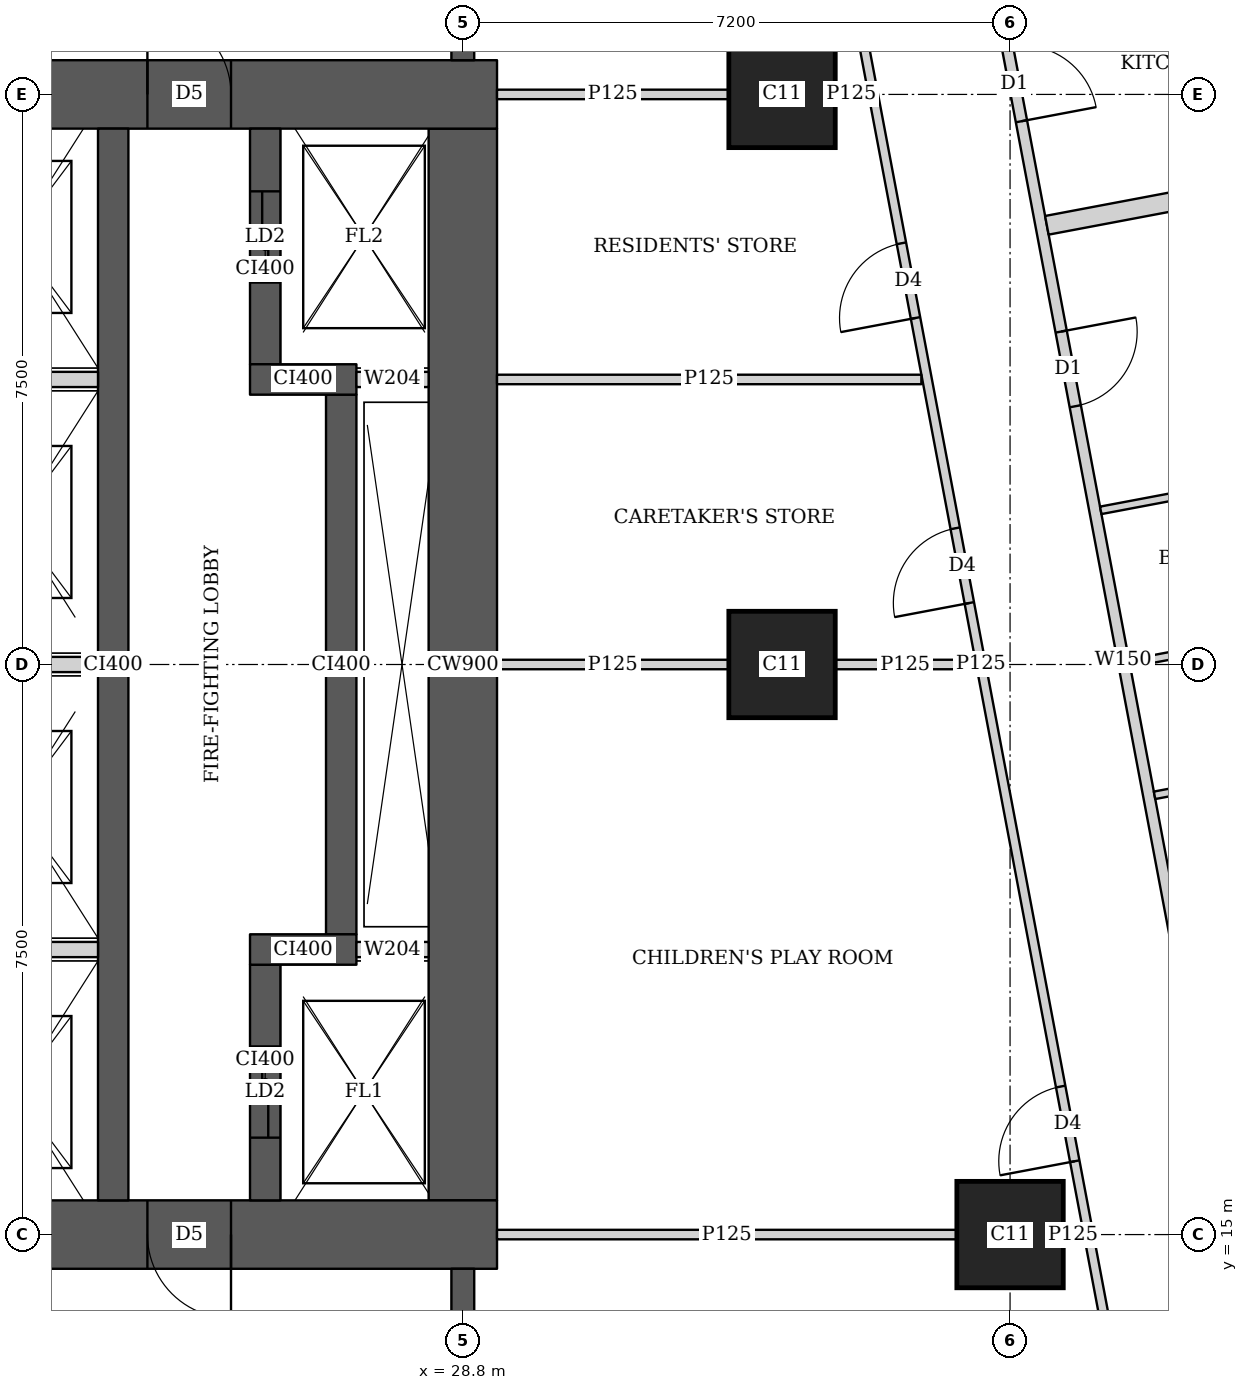
"""IFC4 building model, lengths in metres.
Left out: names, types, materials, properties, quantities, classifications, styles, units other than length and angle.
Written with IfcOpenShell. Run it as: python <this file> out.ifc"""

import sys

from ifc_helpers import new_model, si_unit, direction, frame, frame_2d, origin, origin_2d, place, context, subcontext, project, spatial, rectangle, extrude, element, fill, save


model = new_model("IFC4")
c1 = context("Model", 3, precision=1e-05, world=origin(), true_north=direction((0.0, 1.0)))
c2 = subcontext(c1, "Body", "Model", "MODEL_VIEW")
j1 = project(units=[si_unit("LENGTHUNIT", "METRE"), si_unit("PLANEANGLEUNIT", "RADIAN")], contexts=[c1])
p1 = place(None, origin())
s1 = spatial("IfcSite", under=j1, at=p1, CompositionType="ELEMENT")
p2 = place(p1, origin())
s2 = spatial("IfcBuilding", under=s1, at=p2, CompositionType="ELEMENT")
p3 = place(p2, frame((0.0, 0.0, 208.7)))
s3 = spatial("IfcBuildingStorey", under=s2, at=p3, CompositionType="ELEMENT", Elevation=208.7)
for number, where, z_axis, x_axis in (
    (1, (36.0, 15.0, 0.0), (0.0, 0.0, 1.0), (1.0, 0.0, 0.0)),
    (2, (33.0, 22.5, 0.0), (0.0, 0.0, 1.0), (1.0, 0.0, 0.0)),
    (3, (33.0, 30.0, 0.0), (0.0, 0.0, 1.0), (1.0, 0.0, 0.0)),
):
    element("IfcColumn", number, at=place(p3, frame(where, z_axis=z_axis, x_axis=x_axis)), inside=s3, PredefinedType="COLUMN", context=c2, shape_type="SweptSolid", body=[
        extrude(rectangle(XDim=1.4, YDim=1.4, at=origin_2d()), origin(), (0.0, 0.0, 1.0), 3.75),
    ])
p4 = place(p3, frame((13.95, 15.0, 0.0), z_axis=(0.0, 0.0, 1.0), x_axis=(1.0, 0.0, 0.0)))
e4 = element("IfcWall", 4, at=p4, inside=s3, PredefinedType="SHEAR", context=c2, shape_type="SweptSolid", body=[
    extrude(rectangle(XDim=15.3, YDim=0.9, at=frame_2d((7.65, 0.0))), origin(), (0.0, 0.0, 1.0), 3.75),
])
p5 = place(p4, frame((4.45, 0.0, 0.0)))
e5 = element("IfcOpeningElement", 5, at=p5, cuts=e4, PredefinedType="OPENING", context=c2, shape_type="SweptSolid", body=[
    extrude(rectangle(XDim=1.8, YDim=2.1, at=frame_2d((0.9, 1.05))), frame((0.0, 0.46, 0.0), z_axis=(0.0, -1.0, 0.0), x_axis=(1.0, 0.0, 0.0)), (0.0, 0.0, 1.0), 0.92),
])
p6 = place(p4, frame((10.7, 0.0, 0.0)))
e6 = element("IfcOpeningElement", 6, at=p6, cuts=e4, PredefinedType="OPENING", context=c2, shape_type="SweptSolid", body=[
    extrude(rectangle(XDim=1.1, YDim=2.1, at=frame_2d((0.55, 1.05))), frame((0.0, 0.46, 0.0), z_axis=(0.0, -1.0, 0.0), x_axis=(1.0, 0.0, 0.0)), (0.0, 0.0, 1.0), 0.92),
])
p7 = place(p3, frame((13.95, 30.0, 0.0), z_axis=(0.0, 0.0, 1.0), x_axis=(1.0, 0.0, 0.0)))
e7 = element("IfcWall", 7, at=p7, inside=s3, PredefinedType="SHEAR", context=c2, shape_type="SweptSolid", body=[
    extrude(rectangle(XDim=15.3, YDim=0.9, at=frame_2d((7.65, 0.0))), origin(), (0.0, 0.0, 1.0), 3.75),
])
p8 = place(p7, frame((4.45, 0.0, 0.0)))
e8 = element("IfcOpeningElement", 8, at=p8, cuts=e7, PredefinedType="OPENING", context=c2, shape_type="SweptSolid", body=[
    extrude(rectangle(XDim=1.8, YDim=2.1, at=frame_2d((0.9, 1.05))), frame((0.0, 0.46, 0.0), z_axis=(0.0, -1.0, 0.0), x_axis=(1.0, 0.0, 0.0)), (0.0, 0.0, 1.0), 0.92),
])
p9 = place(p7, frame((10.7, 0.0, 0.0)))
e9 = element("IfcOpeningElement", 9, at=p9, cuts=e7, PredefinedType="OPENING", context=c2, shape_type="SweptSolid", body=[
    extrude(rectangle(XDim=1.1, YDim=2.1, at=frame_2d((0.55, 1.05))), frame((0.0, 0.46, 0.0), z_axis=(0.0, -1.0, 0.0), x_axis=(1.0, 0.0, 0.0)), (0.0, 0.0, 1.0), 0.92),
])
p10 = place(p3, frame((28.8, 15.45, 0.0), z_axis=(0.0, 0.0, 1.0), x_axis=(0.0, 1.0, 0.0)))
e10 = element("IfcWall", 10, at=p10, inside=s3, PredefinedType="SHEAR", context=c2, shape_type="SweptSolid", body=[
    extrude(rectangle(XDim=14.1, YDim=0.9, at=frame_2d((7.05, 0.0))), origin(), (0.0, 0.0, 1.0), 3.75),
])
p11 = place(p3, frame((24.2, 15.45, 0.0), z_axis=(0.0, 0.0, 1.0), x_axis=(0.0, 1.0, 0.0)))
e11 = element("IfcWall", 11, at=p11, inside=s3, PredefinedType="SHEAR", context=c2, shape_type="SweptSolid", body=[
    extrude(rectangle(XDim=14.1, YDim=0.4, at=frame_2d((7.05, 0.0))), origin(), (0.0, 0.0, 1.0), 3.75),
])
p12 = place(p3, frame((26.2, 15.45, 0.0), z_axis=(0.0, 0.0, 1.0), x_axis=(0.0, 1.0, 0.0)))
e12 = element("IfcWall", 12, at=p12, inside=s3, PredefinedType="SHEAR", context=c2, shape_type="SweptSolid", body=[
    extrude(rectangle(XDim=3.1, YDim=0.4, at=frame_2d((1.55, 0.0))), origin(), (0.0, 0.0, 1.0), 3.75),
])
p13 = place(p12, frame((0.825, 0.0, 0.0)))
e13 = element("IfcOpeningElement", 13, at=p13, cuts=e12, PredefinedType="OPENING", context=c2, shape_type="SweptSolid", body=[
    extrude(rectangle(XDim=1.2, YDim=2.1, at=frame_2d((0.6, 1.05))), frame((0.0, 0.21, 0.0), z_axis=(0.0, -1.0, 0.0), x_axis=(1.0, 0.0, 0.0)), (0.0, 0.0, 1.0), 0.42),
])
p14 = place(p3, frame((26.0, 18.75, 0.0), z_axis=(0.0, 0.0, 1.0), x_axis=(1.0, 0.0, 0.0)))
e14 = element("IfcWall", 14, at=p14, inside=s3, PredefinedType="SHEAR", context=c2, shape_type="SweptSolid", body=[
    extrude(rectangle(XDim=1.4, YDim=0.4, at=frame_2d((0.7, 0.0))), origin(), (0.0, 0.0, 1.0), 3.75),
])
p15 = place(p3, frame((27.2, 18.95, 0.0), z_axis=(0.0, 0.0, 1.0), x_axis=(0.0, 1.0, 0.0)))
e15 = element("IfcWall", 15, at=p15, inside=s3, PredefinedType="SHEAR", context=c2, shape_type="SweptSolid", body=[
    extrude(rectangle(XDim=7.1, YDim=0.4, at=frame_2d((3.55, 0.0))), origin(), (0.0, 0.0, 1.0), 3.75),
])
p16 = place(p3, frame((26.0, 26.25, 0.0), z_axis=(0.0, 0.0, 1.0), x_axis=(1.0, 0.0, 0.0)))
e16 = element("IfcWall", 16, at=p16, inside=s3, PredefinedType="SHEAR", context=c2, shape_type="SweptSolid", body=[
    extrude(rectangle(XDim=1.4, YDim=0.4, at=frame_2d((0.7, 0.0))), origin(), (0.0, 0.0, 1.0), 3.75),
])
p17 = place(p3, frame((26.2, 26.45, 0.0), z_axis=(0.0, 0.0, 1.0), x_axis=(0.0, 1.0, 0.0)))
e17 = element("IfcWall", 17, at=p17, inside=s3, PredefinedType="SHEAR", context=c2, shape_type="SweptSolid", body=[
    extrude(rectangle(XDim=3.1, YDim=0.4, at=frame_2d((1.55, 0.0))), origin(), (0.0, 0.0, 1.0), 3.75),
])
p18 = place(p17, frame((1.075, 0.0, 0.0)))
e18 = element("IfcOpeningElement", 18, at=p18, cuts=e17, PredefinedType="OPENING", context=c2, shape_type="SweptSolid", body=[
    extrude(rectangle(XDim=1.2, YDim=2.1, at=frame_2d((0.6, 1.05))), frame((0.0, 0.21, 0.0), z_axis=(0.0, -1.0, 0.0), x_axis=(1.0, 0.0, 0.0)), (0.0, 0.0, 1.0), 0.42),
])
for number, where, z_axis, x_axis in (
    (19, (28.8, 10.35, 0.0), (0.0, 0.0, 1.0), (0.0, 1.0, 0.0)),
    (20, (28.8, 30.45, 0.0), (0.0, 0.0, 1.0), (0.0, 1.0, 0.0)),
):
    element("IfcWall", number, at=place(p3, frame(where, z_axis=z_axis, x_axis=x_axis)), inside=s3, PredefinedType="SHEAR", context=c2, shape_type="SweptSolid", body=[
        extrude(rectangle(XDim=4.2, YDim=0.3, at=frame_2d((2.1, 0.0))), origin(), (0.0, 0.0, 1.0), 3.75),
    ])
p19 = place(p3, frame((33.68, 42.723, 0.0), z_axis=(0.0, 0.0, 1.0), x_axis=(0.185601160014, -0.982625162207, 0.0)))
e21 = element("IfcWall", 21, at=p19, inside=s3, PredefinedType="SOLIDWALL", context=c2, shape_type="SweptSolid", body=[
    extrude(rectangle(XDim=41.051, YDim=0.15, at=frame_2d((20.526, 0.0))), origin(), (0.0, 0.0, 1.0), 2.5),
])
p20 = place(p19, frame((12.307, 0.0, 0.0)))
e22 = element("IfcOpeningElement", 22, at=p20, cuts=e21, PredefinedType="OPENING", context=c2, shape_type="SweptSolid", body=[
    extrude(rectangle(XDim=1.0, YDim=2.1, at=frame_2d((0.5, 1.05))), frame((0.0, 0.085, 0.0), z_axis=(0.0, -1.0, 0.0), x_axis=(1.0, 0.0, 0.0)), (0.0, 0.0, 1.0), 0.17),
])
p21 = place(p19, frame((16.123, 0.0, 0.0)))
e23 = element("IfcOpeningElement", 23, at=p21, cuts=e21, PredefinedType="OPENING", context=c2, shape_type="SweptSolid", body=[
    extrude(rectangle(XDim=1.0, YDim=2.1, at=frame_2d((0.5, 1.05))), frame((0.0, 0.085, 0.0), z_axis=(0.0, -1.0, 0.0), x_axis=(1.0, 0.0, 0.0)), (0.0, 0.0, 1.0), 0.17),
])
p22 = place(p19, frame((30.902, 0.0, 0.0)))
e24 = element("IfcOpeningElement", 24, at=p22, cuts=e21, PredefinedType="OPENING", context=c2, shape_type="SweptSolid", body=[
    extrude(rectangle(XDim=1.0, YDim=2.1, at=frame_2d((0.5, 1.05))), frame((0.0, 0.085, 0.0), z_axis=(0.0, -1.0, 0.0), x_axis=(1.0, 0.0, 0.0)), (0.0, 0.0, 1.0), 0.17),
])
p23 = place(p3, frame((40.657, 25.183, 0.0), z_axis=(0.0, 0.0, 1.0), x_axis=(-0.982585626838, -0.185810349366, 0.0)))
e25 = element("IfcWall", 25, at=p23, inside=s3, PredefinedType="PARTITIONING", context=c2, shape_type="SweptSolid", body=[
    extrude(rectangle(XDim=3.525, YDim=0.1, at=frame_2d((1.763, 0.0))), origin(), (0.0, 0.0, 1.0), 3.5),
])
p24 = place(p3, frame((41.365, 21.433, 0.0), z_axis=(0.0, 0.0, 1.0), x_axis=(-0.982638553676, -0.185530247748, 0.0)))
e26 = element("IfcWall", 26, at=p24, inside=s3, PredefinedType="PARTITIONING", context=c2, shape_type="SweptSolid", body=[
    extrude(rectangle(XDim=3.525, YDim=0.1, at=frame_2d((1.763, 0.0))), origin(), (0.0, 0.0, 1.0), 3.5),
])
p25 = place(p3, frame((41.037, 23.168, 0.0), z_axis=(0.0, 0.0, 1.0), x_axis=(-0.982638553676, -0.185530247748, 0.0)))
e27 = element("IfcWall", 27, at=p25, inside=s3, PredefinedType="PARTITIONING", context=c2, shape_type="SweptSolid", body=[
    extrude(rectangle(XDim=3.525, YDim=0.1, at=frame_2d((1.763, 0.0))), origin(), (0.0, 0.0, 1.0), 2.5),
])
p26 = place(p3, frame((41.177, 29.164, 0.0), z_axis=(0.0, 0.0, 1.0), x_axis=(-0.982642846239, -0.185507511263, 0.0)))
e28 = element("IfcWall", 28, at=p26, inside=s3, PredefinedType="SOLIDWALL", context=c2, shape_type="SweptSolid", body=[
    extrude(rectangle(XDim=4.776, YDim=0.25, at=frame_2d((2.388, 0.0))), origin(), (0.0, 0.0, 1.0), 2.5),
])
p27 = place(p3, frame((37.9, 10.413, 0.0), z_axis=(0.0, 0.0, 1.0), x_axis=(-0.185589740669, 0.982627319058, 0.0)))
e29 = element("IfcWall", 29, at=p27, inside=s3, PredefinedType="PARTITIONING", context=c2, shape_type="SweptSolid", body=[
    extrude(rectangle(XDim=24.602, YDim=0.125, at=frame_2d((12.301, 0.0))), origin(), (0.0, 0.0, 1.0), 2.5),
])
p28 = place(p27, frame((0.708, 0.0, 0.0)))
e30 = element("IfcOpeningElement", 30, at=p28, cuts=e29, PredefinedType="OPENING", context=c2, shape_type="SweptSolid", body=[
    extrude(rectangle(XDim=1.0, YDim=2.1, at=frame_2d((0.5, 1.05))), frame((0.0, 0.073, 0.0), z_axis=(0.0, -1.0, 0.0), x_axis=(1.0, 0.0, 0.0)), (0.0, 0.0, 1.0), 0.145),
])
p29 = place(p27, frame((5.65, 0.0, 0.0)))
e31 = element("IfcOpeningElement", 31, at=p29, cuts=e29, PredefinedType="OPENING", context=c2, shape_type="SweptSolid", body=[
    extrude(rectangle(XDim=1.0, YDim=2.1, at=frame_2d((0.5, 1.05))), frame((0.0, 0.073, 0.0), z_axis=(0.0, -1.0, 0.0), x_axis=(1.0, 0.0, 0.0)), (0.0, 0.0, 1.0), 0.145),
])
p30 = place(p27, frame((13.124, 0.0, 0.0)))
e32 = element("IfcOpeningElement", 32, at=p30, cuts=e29, PredefinedType="OPENING", context=c2, shape_type="SweptSolid", body=[
    extrude(rectangle(XDim=1.0, YDim=2.1, at=frame_2d((0.5, 1.05))), frame((0.0, 0.073, 0.0), z_axis=(0.0, -1.0, 0.0), x_axis=(1.0, 0.0, 0.0)), (0.0, 0.0, 1.0), 0.145),
])
p31 = place(p27, frame((16.94, 0.0, 0.0)))
e33 = element("IfcOpeningElement", 33, at=p31, cuts=e29, PredefinedType="OPENING", context=c2, shape_type="SweptSolid", body=[
    extrude(rectangle(XDim=1.0, YDim=2.1, at=frame_2d((0.5, 1.05))), frame((0.0, 0.073, 0.0), z_axis=(0.0, -1.0, 0.0), x_axis=(1.0, 0.0, 0.0)), (0.0, 0.0, 1.0), 0.145),
])
p32 = place(p27, frame((20.9, 0.0, 0.0)))
e34 = element("IfcOpeningElement", 34, at=p32, cuts=e29, PredefinedType="OPENING", context=c2, shape_type="SweptSolid", body=[
    extrude(rectangle(XDim=1.0, YDim=2.1, at=frame_2d((0.5, 1.05))), frame((0.0, 0.073, 0.0), z_axis=(0.0, -1.0, 0.0), x_axis=(1.0, 0.0, 0.0)), (0.0, 0.0, 1.0), 0.145),
])
p33 = place(p3, frame((29.25, 15.0, 0.0), z_axis=(0.0, 0.0, 1.0), x_axis=(1.0, 0.0, 0.0)))
e35 = element("IfcWall", 35, at=p33, inside=s3, PredefinedType="PARTITIONING", context=c2, shape_type="SweptSolid", body=[
    extrude(rectangle(XDim=6.049, YDim=0.125, at=frame_2d((3.024, 0.0))), origin(), (0.0, 0.0, 1.0), 3.5),
])
p34 = place(p3, frame((36.701, 15.0, 0.0), z_axis=(0.0, 0.0, 1.0), x_axis=(1.0, 0.0, 0.0)))
e36 = element("IfcWall", 36, at=p34, inside=s3, PredefinedType="PARTITIONING", context=c2, shape_type="SweptSolid", body=[
    extrude(rectangle(XDim=0.257, YDim=0.125, at=frame_2d((0.128, 0.0))), origin(), (0.0, 0.0, 1.0), 3.5),
])
p35 = place(p3, frame((29.25, 22.5, 0.0), z_axis=(0.0, 0.0, 1.0), x_axis=(1.0, 0.0, 0.0)))
e37 = element("IfcWall", 37, at=p35, inside=s3, PredefinedType="PARTITIONING", context=c2, shape_type="SweptSolid", body=[
    extrude(rectangle(XDim=3.049, YDim=0.125, at=frame_2d((1.524, 0.0))), origin(), (0.0, 0.0, 1.0), 3.5),
])
p36 = place(p3, frame((33.701, 22.5, 0.0), z_axis=(0.0, 0.0, 1.0), x_axis=(1.0, 0.0, 0.0)))
e38 = element("IfcWall", 38, at=p36, inside=s3, PredefinedType="PARTITIONING", context=c2, shape_type="SweptSolid", body=[
    extrude(rectangle(XDim=1.841, YDim=0.125, at=frame_2d((0.92, 0.0))), origin(), (0.0, 0.0, 1.0), 2.5),
])
p37 = place(p3, frame((29.25, 26.25, 0.0), z_axis=(0.0, 0.0, 1.0), x_axis=(1.0, 0.0, 0.0)))
e39 = element("IfcWall", 39, at=p37, inside=s3, PredefinedType="PARTITIONING", context=c2, shape_type="SweptSolid", body=[
    extrude(rectangle(XDim=5.583, YDim=0.125, at=frame_2d((2.792, 0.0))), origin(), (0.0, 0.0, 1.0), 3.5),
])
p38 = place(p3, frame((29.25, 30.0, 0.0), z_axis=(0.0, 0.0, 1.0), x_axis=(1.0, 0.0, 0.0)))
e40 = element("IfcWall", 40, at=p38, inside=s3, PredefinedType="PARTITIONING", context=c2, shape_type="SweptSolid", body=[
    extrude(rectangle(XDim=3.049, YDim=0.125, at=frame_2d((1.524, 0.0))), origin(), (0.0, 0.0, 1.0), 3.5),
])
p39 = place(p3, frame((33.701, 30.0, 0.0), z_axis=(0.0, 0.0, 1.0), x_axis=(1.0, 0.0, 0.0)))
e41 = element("IfcWall", 41, at=p39, inside=s3, PredefinedType="PARTITIONING", context=c2, shape_type="SweptSolid", body=[
    extrude(rectangle(XDim=0.424, YDim=0.125, at=frame_2d((0.212, 0.0))), origin(), (0.0, 0.0, 1.0), 2.5),
])
for number, where, z_axis, x_axis in (
    (42, (21.8, 18.75, 0.0), (0.0, 0.0, 1.0), (1.0, 0.0, 0.0)),
    (43, (21.8, 22.5, 0.0), (0.0, 0.0, 1.0), (1.0, 0.0, 0.0)),
    (44, (21.8, 26.25, 0.0), (0.0, 0.0, 1.0), (1.0, 0.0, 0.0)),
):
    element("IfcWall", number, at=place(p3, frame(where, z_axis=z_axis, x_axis=x_axis)), inside=s3, PredefinedType="SOLIDWALL", context=c2, shape_type="SweptSolid", body=[
        extrude(rectangle(XDim=2.2, YDim=0.2, at=frame_2d((1.1, 0.0))), origin(), (0.0, 0.0, 1.0), 3.5),
    ])
for number, where, z_axis, x_axis in (
    (45, (27.4, 18.75, 0.0), (0.0, 0.0, 1.0), (1.0, 0.0, 0.0)),
    (46, (27.4, 26.25, 0.0), (0.0, 0.0, 1.0), (1.0, 0.0, 0.0)),
):
    element("IfcWall", number, at=place(p3, frame(where, z_axis=z_axis, x_axis=x_axis)), inside=s3, PredefinedType="SOLIDWALL", context=c2, shape_type="SweptSolid", body=[
        extrude(rectangle(XDim=0.95, YDim=0.2, at=frame_2d((0.475, 0.0))), origin(), (0.0, 0.0, 1.0), 3.5),
    ])
p40 = place(p20, origin())
e47 = element("IfcDoor", 47, at=p40, inside=s3, OperationType="SINGLE_SWING_RIGHT", PredefinedType="DOOR", context=c2, shape_type="SweptSolid", body=[
    extrude(rectangle(XDim=1.0, YDim=2.1, at=frame_2d((0.5, 1.05))), frame((0.0, 0.025, 0.0), z_axis=(0.0, -1.0, 0.0), x_axis=(1.0, 0.0, 0.0)), (0.0, 0.0, 1.0), 0.05),
])
fill(e22, e47)
p41 = place(p21, origin())
e48 = element("IfcDoor", 48, at=p41, inside=s3, OperationType="SINGLE_SWING_LEFT", PredefinedType="DOOR", context=c2, shape_type="SweptSolid", body=[
    extrude(rectangle(XDim=1.0, YDim=2.1, at=frame_2d((0.5, 1.05))), frame((0.0, 0.025, 0.0), z_axis=(0.0, -1.0, 0.0), x_axis=(1.0, 0.0, 0.0)), (0.0, 0.0, 1.0), 0.05),
])
fill(e23, e48)
p42 = place(p29, origin())
e49 = element("IfcDoor", 49, at=p42, inside=s3, OperationType="SINGLE_SWING_LEFT", PredefinedType="DOOR", context=c2, shape_type="SweptSolid", body=[
    extrude(rectangle(XDim=1.0, YDim=2.1, at=frame_2d((0.5, 1.05))), frame((0.0, 0.025, 0.0), z_axis=(0.0, -1.0, 0.0), x_axis=(1.0, 0.0, 0.0)), (0.0, 0.0, 1.0), 0.05),
])
fill(e31, e49)
p43 = place(p30, origin())
e50 = element("IfcDoor", 50, at=p43, inside=s3, OperationType="SINGLE_SWING_LEFT", PredefinedType="DOOR", context=c2, shape_type="SweptSolid", body=[
    extrude(rectangle(XDim=1.0, YDim=2.1, at=frame_2d((0.5, 1.05))), frame((0.0, 0.025, 0.0), z_axis=(0.0, -1.0, 0.0), x_axis=(1.0, 0.0, 0.0)), (0.0, 0.0, 1.0), 0.05),
])
fill(e32, e50)
p44 = place(p31, origin())
e51 = element("IfcDoor", 51, at=p44, inside=s3, OperationType="SINGLE_SWING_LEFT", PredefinedType="DOOR", context=c2, shape_type="SweptSolid", body=[
    extrude(rectangle(XDim=1.0, YDim=2.1, at=frame_2d((0.5, 1.05))), frame((0.0, 0.025, 0.0), z_axis=(0.0, -1.0, 0.0), x_axis=(1.0, 0.0, 0.0)), (0.0, 0.0, 1.0), 0.05),
])
fill(e33, e51)
p45 = place(p6, origin())
e52 = element("IfcDoor", 52, at=p45, inside=s3, OperationType="SINGLE_SWING_LEFT", PredefinedType="DOOR", context=c2, shape_type="SweptSolid", body=[
    extrude(rectangle(XDim=1.1, YDim=2.1, at=frame_2d((0.55, 1.05))), frame((0.0, 0.025, 0.0), z_axis=(0.0, -1.0, 0.0), x_axis=(1.0, 0.0, 0.0)), (0.0, 0.0, 1.0), 0.05),
])
fill(e6, e52)
p46 = place(p9, origin())
e53 = element("IfcDoor", 53, at=p46, inside=s3, OperationType="SINGLE_SWING_LEFT", PredefinedType="DOOR", context=c2, shape_type="SweptSolid", body=[
    extrude(rectangle(XDim=1.1, YDim=2.1, at=frame_2d((0.55, 1.05))), frame((0.0, 0.025, 0.0), z_axis=(0.0, -1.0, 0.0), x_axis=(1.0, 0.0, 0.0)), (0.0, 0.0, 1.0), 0.05),
])
fill(e9, e53)
p47 = place(p13, origin())
e54 = element("IfcDoor", 54, at=p47, inside=s3, OperationType="DOUBLE_DOOR_SLIDING", PredefinedType="DOOR", context=c2, shape_type="SweptSolid", body=[
    extrude(rectangle(XDim=1.2, YDim=2.1, at=frame_2d((0.6, 1.05))), frame((0.0, 0.025, 0.0), z_axis=(0.0, -1.0, 0.0), x_axis=(1.0, 0.0, 0.0)), (0.0, 0.0, 1.0), 0.05),
])
fill(e13, e54)
p48 = place(p18, origin())
e55 = element("IfcDoor", 55, at=p48, inside=s3, OperationType="DOUBLE_DOOR_SLIDING", PredefinedType="DOOR", context=c2, shape_type="SweptSolid", body=[
    extrude(rectangle(XDim=1.2, YDim=2.1, at=frame_2d((0.6, 1.05))), frame((0.0, 0.025, 0.0), z_axis=(0.0, -1.0, 0.0), x_axis=(1.0, 0.0, 0.0)), (0.0, 0.0, 1.0), 0.05),
])
fill(e18, e55)
save(model, sys.argv[1])
